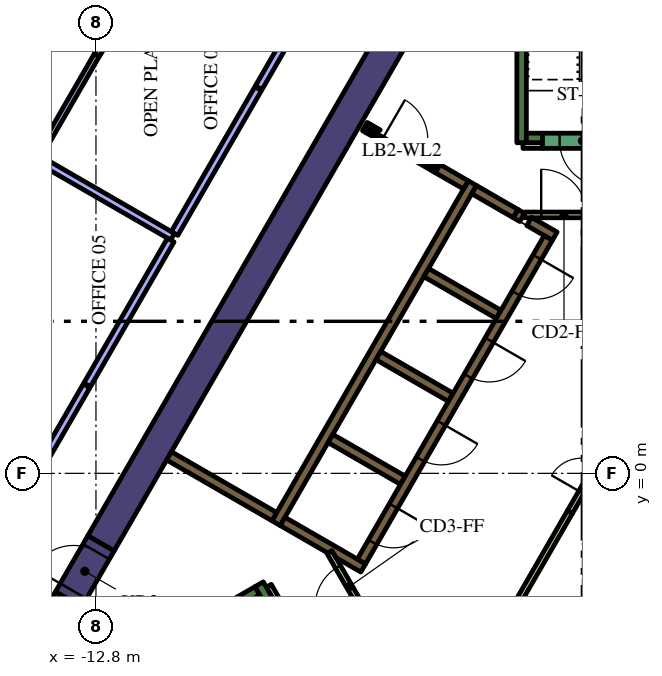
"""IFC4 building model, lengths in metres.
Left out: names, types, materials, properties, quantities, classifications, styles, units other than length and angle.
Written with IfcOpenShell. Run it as: python <this file> out.ifc"""

import sys

from ifc_helpers import new_model, si_unit, direction, frame, frame_2d, origin, place, context, subcontext, project, spatial, polyline, rectangle, outline, extrude, element, fill, save


model = new_model("IFC4")
c1 = context("Model", 3, precision=1e-05, world=origin(), true_north=direction((0.0, 1.0)))
c2 = subcontext(c1, "Body", "Model", "MODEL_VIEW")
j1 = project(units=[si_unit("LENGTHUNIT", "METRE"), si_unit("PLANEANGLEUNIT", "RADIAN")], contexts=[c1])
p1 = place(None, origin())
s1 = spatial("IfcSite", under=j1, at=p1, CompositionType="ELEMENT")
p2 = place(p1, origin())
s2 = spatial("IfcBuilding", under=s1, at=p2, CompositionType="ELEMENT")
p3 = place(p2, frame((0.0, 0.0, 162.6)))
s3 = spatial("IfcBuildingStorey", under=s2, at=p3, CompositionType="ELEMENT", Elevation=162.6)
p4 = place(p3, frame((-13.518, -3.314, 0.0), z_axis=(0.0, 0.0, 1.0), x_axis=(-0.499969377405, -0.866043083026, 0.0)))
e1 = element("IfcWall", 1, at=p4, inside=s3, PredefinedType="SOLIDWALL", context=c2, shape_type="SweptSolid", body=[
    extrude(rectangle(XDim=2.824, YDim=0.8, at=frame_2d((1.412, 0.0))), origin(), (0.0, 0.0, 1.0), 4.2),
])
p5 = place(p3, frame((-12.668, -1.842, 0.0), z_axis=(0.0, 0.0, 1.0), x_axis=(0.500003640647, 0.866023301845, 0.0)))
e2 = element("IfcWall", 2, at=p5, inside=s3, PredefinedType="SOLIDWALL", context=c2, shape_type="SweptSolid", body=[
    extrude(rectangle(XDim=15.858, YDim=0.8, at=frame_2d((7.929, 0.0))), origin(), (0.0, 0.0, 1.0), 4.2),
])
p6 = place(p3, frame((-1.6, 8.7, 0.0), z_axis=(0.0, 0.0, 1.0), x_axis=(0.0, 1.0, 0.0)))
e3 = element("IfcWall", 3, at=p6, inside=s3, PredefinedType="SOLIDWALL", context=c2, shape_type="SweptSolid", body=[
    extrude(rectangle(XDim=7.05, YDim=0.25, at=frame_2d((3.525, 0.0))), origin(), (0.0, 0.0, 1.0), 4.2),
])
p7 = place(p3, frame((-1.475, 8.825, 0.0), z_axis=(0.0, 0.0, 1.0), x_axis=(1.0, 0.0, 0.0)))
e4 = element("IfcWall", 4, at=p7, inside=s3, PredefinedType="SOLIDWALL", context=c2, shape_type="SweptSolid", body=[
    extrude(rectangle(XDim=0.425, YDim=0.25, at=frame_2d((0.212, 0.0))), origin(), (0.0, 0.0, 1.0), 4.2),
])
p8 = place(p3, frame((-14.44, -6.49, 0.0), z_axis=(0.0, 0.0, 1.0), x_axis=(0.866022966069, 0.500004222222, 0.0)))
e5 = element("IfcWall", 5, at=p8, inside=s3, PredefinedType="SOLIDWALL", context=c2, shape_type="SweptSolid", body=[
    extrude(rectangle(XDim=6.8, YDim=0.25, at=frame_2d((3.4, 0.0))), origin(), (0.0, 0.0, 1.0), 4.2),
])
p9 = place(p3, frame((-8.168, -3.503, 0.0), z_axis=(0.0, 0.0, 1.0), x_axis=(-0.499952099219, 0.866053057547, 0.0)))
e6 = element("IfcWall", 6, at=p9, inside=s3, PredefinedType="SOLIDWALL", context=c2, shape_type="SweptSolid", body=[
    extrude(rectangle(XDim=0.675, YDim=0.25, at=frame_2d((0.337, 0.0))), origin(), (0.0, 0.0, 1.0), 4.2),
])
p10 = place(p3, frame((-8.06, -1.311, 0.0), z_axis=(0.0, 0.0, 1.0), x_axis=(0.50000273126, 0.866023826885, 0.0)))
e7 = element("IfcWall", 7, at=p10, inside=s3, PredefinedType="SOLIDWALL", context=c2, shape_type="SweptSolid", body=[
    extrude(rectangle(XDim=10.33, YDim=0.25, at=frame_2d((5.165, 0.0))), origin(), (0.0, 0.0, 1.0), 4.2),
])
p11 = place(p3, frame((-1.758, 6.835, 0.0), z_axis=(0.0, 0.0, 1.0), x_axis=(0.865982457891, -0.500074377092, 0.0)))
e8 = element("IfcWall", 8, at=p11, inside=s3, PredefinedType="SOLIDWALL", context=c2, shape_type="SweptSolid", body=[
    extrude(rectangle(XDim=0.2, YDim=0.25, at=frame_2d((0.1, 0.0))), origin(), (0.0, 0.0, 1.0), 4.2),
])
p12 = place(p3, frame((-1.76, 6.836, 0.0), z_axis=(0.0, 0.0, 1.0), x_axis=(-0.865952863304, 0.500125622755, 0.0)))
e9 = element("IfcWall", 9, at=p12, inside=s3, PredefinedType="SOLIDWALL", context=c2, shape_type="SweptSolid", body=[
    extrude(rectangle(XDim=1.258, YDim=0.25, at=frame_2d((0.629, 0.0))), origin(), (0.0, 0.0, 1.0), 4.2),
])
p13 = place(p3, frame((-0.728, 6.24, 0.0), z_axis=(0.0, 0.0, 1.0), x_axis=(-0.865955664968, 0.500120771724, 0.0)))
e10 = element("IfcWall", 10, at=p13, inside=s3, PredefinedType="SOLIDWALL", context=c2, shape_type="SweptSolid", body=[
    extrude(rectangle(XDim=0.778, YDim=0.25, at=frame_2d((0.389, 0.0))), origin(), (0.0, 0.0, 1.0), 4.2),
])
for number, where, z_axis, x_axis in (
    (11, (-2.204, 4.182, 0.0), (0.0, 0.0, 1.0), (-0.866, 0.5, 0.0)),
    (12, (-5.369, 3.1, 0.0), (0.0, 0.0, 1.0), (0.866, -0.5, 0.0)),
    (13, (-4.724, -0.182, 0.0), (0.0, 0.0, 1.0), (-0.866, 0.5, 0.0)),
):
    element("IfcWall", number, at=place(p3, frame(where, z_axis=z_axis, x_axis=x_axis)), inside=s3, PredefinedType="SOLIDWALL", context=c2, shape_type="SweptSolid", body=[
        extrude(rectangle(XDim=2.2, YDim=0.25, at=frame_2d((1.1, 0.0))), origin(), (0.0, 0.0, 1.0), 4.2),
    ])
p14 = place(p3, origin())
e14 = element("IfcWall", 14, at=p14, inside=s3, PredefinedType="SOLIDWALL", context=c2, shape_type="SweptSolid", body=[
    extrude(outline(polyline([(-5.922, -2.257), (-5.922, -2.257), (-5.705, -2.382), (-5.83, -2.598), (-6.483, -2.221), (-6.591, -2.033), (-6.591, -2.033), (-6.7, -2.096), (-7.952, -1.373), (-7.827, -1.156), (-5.922, -2.257)])), origin(), (0.0, 0.0, 1.0), 4.2),
])
p15 = place(p3, frame((-8.106, -1.14, 0.0), z_axis=(0.0, 0.0, 1.0), x_axis=(-0.866008981251, 0.500028443584, 0.0)))
e15 = element("IfcWall", 15, at=p15, inside=s3, PredefinedType="SOLIDWALL", context=c2, shape_type="SweptSolid", body=[
    extrude(rectangle(XDim=3.2, YDim=0.25, at=frame_2d((1.6, 0.0))), origin(), (0.0, 0.0, 1.0), 4.2),
])
p16 = place(p3, frame((-5.725, 9.125, 0.0), z_axis=(0.0, 0.0, 1.0), x_axis=(0.866185586049, -0.49972245349, 0.0)))
e16 = element("IfcWall", 16, at=p16, inside=s3, PredefinedType="SOLIDWALL", context=c2, shape_type="SweptSolid", body=[
    extrude(rectangle(XDim=0.11, YDim=0.25, at=frame_2d((0.055, 0.0))), origin(), (0.0, 0.0, 1.0), 4.2),
])
p17 = place(p3, frame((-3.066, 7.59, 0.0), z_axis=(0.0, 0.0, 1.0), x_axis=(-0.866081358704, 0.49990307071, 0.0)))
e17 = element("IfcWall", 17, at=p17, inside=s3, PredefinedType="SOLIDWALL", context=c2, shape_type="SweptSolid", body=[
    extrude(rectangle(XDim=0.858, YDim=0.25, at=frame_2d((0.429, 0.0))), origin(), (0.0, 0.0, 1.0), 4.2),
])
e18 = element("IfcWall", 18, at=p14, inside=s3, PredefinedType="SOLIDWALL", context=c2, shape_type="SweptSolid", body=[
    extrude(outline(polyline([(-3.748, 8.128), (-3.813, 8.015), (-4.027, 8.139), (-4.017, 8.156), (-4.008, 8.173), (-4.0, 8.192), (-3.995, 8.21), (-3.991, 8.23), (-3.99, 8.25), (-3.99, 8.268), (-3.748, 8.128)])), origin(), (0.0, 0.0, 1.0), 4.2),
])
e19 = element("IfcWall", 19, at=p14, inside=s3, PredefinedType="SOLIDWALL", context=c2, shape_type="SweptSolid", body=[
    extrude(outline(polyline([(-5.689, 8.96), (-5.69, 8.961), (-5.565, 9.177), (-5.319, 9.035), (-5.335, 9.026), (-5.351, 9.015), (-5.366, 9.002), (-5.379, 8.988), (-5.392, 8.972), (-5.402, 8.956), (-5.412, 8.939), (-5.629, 9.064), (-5.629, 9.064), (-5.689, 8.96)])), origin(), (0.0, 0.0, 1.0), 4.2),
])
for number, where, z_axis, x_axis in (
    (20, (-8.252, -2.958, 0.0), (0.0, 0.0, 1.0), (0.5, -0.866, 0.0)),
    (21, (-1.564, 8.625, 0.0), (0.0, 0.0, 1.0), (1.0, 0.0, 0.0)),
):
    element("IfcWall", number, at=place(p3, frame(where, z_axis=z_axis, x_axis=x_axis)), inside=s3, PredefinedType="PARTITIONING", context=c2, shape_type="SweptSolid", body=[
        extrude(rectangle(XDim=0.514, YDim=0.15, at=frame_2d((0.257, 0.0))), origin(), (0.0, 0.0, 1.0), 3.15),
    ])
p18 = place(p3, frame((-1.887, -3.718, 0.0), z_axis=(0.0, 0.0, 1.0), x_axis=(0.500043732237, 0.866000153493, 0.0)))
e22 = element("IfcWall", 22, at=p18, inside=s3, PredefinedType="PARTITIONING", context=c2, shape_type="SweptSolid", body=[
    extrude(rectangle(XDim=3.114, YDim=0.15, at=frame_2d((1.557, 0.0))), origin(), (0.0, 0.0, 1.0), 3.15),
])
p19 = place(p3, frame((-0.898, 6.194, 0.0), z_axis=(0.0, 0.0, 1.0), x_axis=(-0.499996202215, -0.866027596426, 0.0)))
e23 = element("IfcWall", 23, at=p19, inside=s3, PredefinedType="SOLIDWALL", context=c2, shape_type="SweptSolid", body=[
    extrude(rectangle(XDim=9.83, YDim=0.25, at=frame_2d((4.915, 0.0))), origin(), (0.0, 0.0, 1.0), 4.2),
])
p20 = place(p19, frame((0.585, 0.0, 0.0)))
e24 = element("IfcOpeningElement", 24, at=p20, cuts=e23, PredefinedType="OPENING", context=c2, shape_type="SweptSolid", body=[
    extrude(rectangle(XDim=1.1, YDim=2.1, at=frame_2d((0.55, 1.05))), frame((0.0, 0.135, 0.0), z_axis=(0.0, -1.0, 0.0), x_axis=(1.0, 0.0, 0.0)), (0.0, 0.0, 1.0), 0.27),
])
p21 = place(p19, frame((3.105, 0.0, 0.0)))
e25 = element("IfcOpeningElement", 25, at=p21, cuts=e23, PredefinedType="OPENING", context=c2, shape_type="SweptSolid", body=[
    extrude(rectangle(XDim=1.1, YDim=2.1, at=frame_2d((0.55, 1.05))), frame((0.0, 0.135, 0.0), z_axis=(0.0, -1.0, 0.0), x_axis=(1.0, 0.0, 0.0)), (0.0, 0.0, 1.0), 0.27),
])
p22 = place(p19, frame((5.625, 0.0, 0.0)))
e26 = element("IfcOpeningElement", 26, at=p22, cuts=e23, PredefinedType="OPENING", context=c2, shape_type="SweptSolid", body=[
    extrude(rectangle(XDim=1.1, YDim=2.1, at=frame_2d((0.55, 1.05))), frame((0.0, 0.135, 0.0), z_axis=(0.0, -1.0, 0.0), x_axis=(1.0, 0.0, 0.0)), (0.0, 0.0, 1.0), 0.27),
])
p23 = place(p19, frame((8.145, 0.0, 0.0)))
e27 = element("IfcOpeningElement", 27, at=p23, cuts=e23, PredefinedType="OPENING", context=c2, shape_type="SweptSolid", body=[
    extrude(rectangle(XDim=1.1, YDim=2.1, at=frame_2d((0.55, 1.05))), frame((0.0, 0.135, 0.0), z_axis=(0.0, -1.0, 0.0), x_axis=(1.0, 0.0, 0.0)), (0.0, 0.0, 1.0), 0.27),
])
p24 = place(p3, frame((1.05, 8.75, 0.0), z_axis=(0.0, 0.0, 1.0), x_axis=(-1.0, 0.0, 0.0)))
e28 = element("IfcWall", 28, at=p24, inside=s3, PredefinedType="SOLIDWALL", context=c2, shape_type="SweptSolid", body=[
    extrude(rectangle(XDim=2.1, YDim=0.4, at=frame_2d((1.05, 0.0))), origin(), (0.0, 0.0, 1.0), 4.2),
])
p25 = place(p24, frame((0.45, 0.0, 0.0)))
e29 = element("IfcOpeningElement", 29, at=p25, cuts=e28, PredefinedType="OPENING", context=c2, shape_type="SweptSolid", body=[
    extrude(rectangle(XDim=1.2, YDim=2.1, at=frame_2d((0.6, 1.05))), frame((0.0, 0.21, 0.0), z_axis=(0.0, -1.0, 0.0), x_axis=(1.0, 0.0, 0.0)), (0.0, 0.0, 1.0), 0.42),
])
p26 = place(p3, frame((-0.33, -1.022, 0.0), z_axis=(0.0, 0.0, 1.0), x_axis=(0.500027713859, 0.866009402589, 0.0)))
e30 = element("IfcWall", 30, at=p26, inside=s3, PredefinedType="PARTITIONING", context=c2, shape_type="SweptSolid", body=[
    extrude(rectangle(XDim=2.1, YDim=0.15, at=frame_2d((1.05, 0.0))), origin(), (0.0, 0.0, 1.0), 3.15),
])
p27 = place(p26, frame((0.6, 0.0, 0.0)))
e31 = element("IfcOpeningElement", 31, at=p27, cuts=e30, PredefinedType="OPENING", context=c2, shape_type="SweptSolid", body=[
    extrude(rectangle(XDim=0.9, YDim=2.1, at=frame_2d((0.45, 1.05))), frame((0.0, 0.085, 0.0), z_axis=(0.0, -1.0, 0.0), x_axis=(1.0, 0.0, 0.0)), (0.0, 0.0, 1.0), 0.17),
])
p28 = place(p3, frame((-1.534, 6.8, 0.0), z_axis=(0.0, 0.0, 1.0), x_axis=(1.0, 0.0, 0.0)))
e32 = element("IfcWall", 32, at=p28, inside=s3, PredefinedType="PARTITIONING", context=c2, shape_type="SweptSolid", body=[
    extrude(rectangle(XDim=2.1, YDim=0.15, at=frame_2d((1.05, 0.0))), origin(), (0.0, 0.0, 1.0), 3.15),
])
p29 = place(p28, frame((0.45, 0.0, 0.0)))
e33 = element("IfcOpeningElement", 33, at=p29, cuts=e32, PredefinedType="OPENING", context=c2, shape_type="SweptSolid", body=[
    extrude(rectangle(XDim=1.2, YDim=2.1, at=frame_2d((0.6, 1.05))), frame((0.0, 0.085, 0.0), z_axis=(0.0, -1.0, 0.0), x_axis=(1.0, 0.0, 0.0)), (0.0, 0.0, 1.0), 0.17),
])
p30 = place(p3, frame((-5.606, -3.89, 0.0), z_axis=(0.0, 0.0, 1.0), x_axis=(-0.500027713859, 0.866009402589, 0.0)))
e34 = element("IfcWall", 34, at=p30, inside=s3, PredefinedType="PARTITIONING", context=c2, shape_type="SweptSolid", body=[
    extrude(rectangle(XDim=2.1, YDim=0.15, at=frame_2d((1.05, 0.0))), origin(), (0.0, 0.0, 1.0), 3.15),
])
p31 = place(p30, frame((0.45, 0.0, 0.0)))
e35 = element("IfcOpeningElement", 35, at=p31, cuts=e34, PredefinedType="OPENING", context=c2, shape_type="SweptSolid", body=[
    extrude(rectangle(XDim=1.2, YDim=2.1, at=frame_2d((0.6, 1.05))), frame((0.0, 0.085, 0.0), z_axis=(0.0, -1.0, 0.0), x_axis=(1.0, 0.0, 0.0)), (0.0, 0.0, 1.0), 0.17),
])
p32 = place(p3, frame((-5.659, 9.012, 0.0), z_axis=(0.0, 0.0, 1.0), x_axis=(0.866009402589, -0.500027713859, 0.0)))
e36 = element("IfcWall", 36, at=p32, inside=s3, PredefinedType="PARTITIONING", context=c2, shape_type="SweptSolid", body=[
    extrude(rectangle(XDim=2.1, YDim=0.12, at=frame_2d((1.05, 0.0))), origin(), (0.0, 0.0, 1.0), 3.15),
])
p33 = place(p32, frame((0.45, 0.0, 0.0)))
e37 = element("IfcOpeningElement", 37, at=p33, cuts=e36, PredefinedType="OPENING", context=c2, shape_type="SweptSolid", body=[
    extrude(rectangle(XDim=1.2, YDim=2.1, at=frame_2d((0.6, 1.05))), frame((0.0, 0.07, 0.0), z_axis=(0.0, -1.0, 0.0), x_axis=(1.0, 0.0, 0.0)), (0.0, 0.0, 1.0), 0.14),
])
p34 = place(p3, frame((-13.518, -3.314, 0.0), z_axis=(0.0, 0.0, 1.0), x_axis=(0.500062241894, 0.865989465428, 0.0)))
e38 = element("IfcWall", 38, at=p34, inside=s3, PredefinedType="SOLIDWALL", context=c2, shape_type="SweptSolid", body=[
    extrude(rectangle(XDim=1.7, YDim=0.8, at=frame_2d((0.85, 0.0))), origin(), (0.0, 0.0, 1.0), 4.2),
])
p35 = place(p34, frame((0.25, 0.0, 0.0)))
e39 = element("IfcOpeningElement", 39, at=p35, cuts=e38, PredefinedType="OPENING", context=c2, shape_type="SweptSolid", body=[
    extrude(rectangle(XDim=1.2, YDim=2.1, at=frame_2d((0.6, 1.05))), frame((0.0, 0.41, 0.0), z_axis=(0.0, -1.0, 0.0), x_axis=(1.0, 0.0, 0.0)), (0.0, 0.0, 1.0), 0.82),
])
p36 = place(p3, frame((-12.779, 11.002, 0.0), z_axis=(0.0, 0.0, 1.0), x_axis=(0.527026092571, 0.849849102929, 0.0)))
e40 = element("IfcWall", 40, at=p36, inside=s3, PredefinedType="PARTITIONING", context=c2, shape_type="SweptSolid", body=[
    extrude(rectangle(XDim=6.407, YDim=0.15, at=frame_2d((3.204, 0.0))), origin(), (0.0, 0.0, 1.0), 3.15),
])
p37 = place(p36, frame((2.707, 0.0, 0.0)))
e41 = element("IfcOpeningElement", 41, at=p37, cuts=e40, PredefinedType="OPENING", context=c2, shape_type="SweptSolid", body=[
    extrude(rectangle(XDim=0.9, YDim=2.1, at=frame_2d((0.45, 1.05))), frame((0.0, 0.085, 0.0), z_axis=(0.0, -1.0, 0.0), x_axis=(1.0, 0.0, 0.0)), (0.0, 0.0, 1.0), 0.17),
])
p38 = place(p3, frame((-12.779, 11.002, 0.0), z_axis=(0.0, 0.0, 1.0), x_axis=(-0.499996312652, -0.866027532665, 0.0)))
e42 = element("IfcWall", 42, at=p38, inside=s3, PredefinedType="PARTITIONING", context=c2, shape_type="SweptSolid", body=[
    extrude(rectangle(XDim=3.138, YDim=0.15, at=frame_2d((1.569, 0.0))), origin(), (0.0, 0.0, 1.0), 3.15),
])
p39 = place(p3, frame((-10.782, 6.225, 0.0), z_axis=(0.0, 0.0, 1.0), x_axis=(-0.866034752867, 0.499983806564, 0.0)))
e43 = element("IfcWall", 43, at=p39, inside=s3, PredefinedType="PARTITIONING", context=c2, shape_type="SweptSolid", body=[
    extrude(rectangle(XDim=4.043, YDim=0.2, at=frame_2d((2.021, 0.0))), origin(), (0.0, 0.0, 1.0), 3.15),
])
p40 = place(p3, frame((-8.532, 10.122, 0.0), z_axis=(0.0, 0.0, 1.0), x_axis=(-0.499988222896, -0.866032203192, 0.0)))
e44 = element("IfcWall", 44, at=p40, inside=s3, PredefinedType="PARTITIONING", context=c2, shape_type="SweptSolid", body=[
    extrude(rectangle(XDim=4.4, YDim=0.2, at=frame_2d((2.2, 0.0))), origin(), (0.0, 0.0, 1.0), 3.15),
])
p41 = place(p3, frame((-3.522, 18.8, 0.0), z_axis=(0.0, 0.0, 1.0), x_axis=(-0.500015783377, -0.866016291056, 0.0)))
e45 = element("IfcWall", 45, at=p41, inside=s3, PredefinedType="PARTITIONING", context=c2, shape_type="SweptSolid", body=[
    extrude(rectangle(XDim=9.99, YDim=0.2, at=frame_2d((4.995, 0.0))), origin(), (0.0, 0.0, 1.0), 3.15),
])
p42 = place(p41, frame((4.5, 0.0, 0.0)))
e46 = element("IfcOpeningElement", 46, at=p42, cuts=e45, PredefinedType="OPENING", context=c2, shape_type="SweptSolid", body=[
    extrude(rectangle(XDim=1.0, YDim=2.1, at=frame_2d((0.5, 1.05))), frame((0.0, 0.11, 0.0), z_axis=(0.0, -1.0, 0.0), x_axis=(1.0, 0.0, 0.0)), (0.0, 0.0, 1.0), 0.22),
])
p43 = place(p3, frame((-10.832, 6.138, 0.0), z_axis=(0.0, 0.0, 1.0), x_axis=(-0.499988222896, -0.866032203192, 0.0)))
e47 = element("IfcWall", 47, at=p43, inside=s3, PredefinedType="PARTITIONING", context=c2, shape_type="SweptSolid", body=[
    extrude(rectangle(XDim=4.4, YDim=0.2, at=frame_2d((2.2, 0.0))), origin(), (0.0, 0.0, 1.0), 3.15),
])
p44 = place(p3, frame((-13.047, 2.302, 0.0), z_axis=(0.0, 0.0, 1.0), x_axis=(-0.499986873641, -0.866032982159, 0.0)))
e48 = element("IfcWall", 48, at=p44, inside=s3, PredefinedType="PARTITIONING", context=c2, shape_type="SweptSolid", body=[
    extrude(rectangle(XDim=9.99, YDim=0.2, at=frame_2d((4.995, 0.0))), origin(), (0.0, 0.0, 1.0), 3.15),
])
p45 = place(p44, frame((4.5, 0.0, 0.0)))
e49 = element("IfcOpeningElement", 49, at=p45, cuts=e48, PredefinedType="OPENING", context=c2, shape_type="SweptSolid", body=[
    extrude(rectangle(XDim=1.0, YDim=2.1, at=frame_2d((0.5, 1.05))), frame((0.0, 0.11, 0.0), z_axis=(0.0, -1.0, 0.0), x_axis=(1.0, 0.0, 0.0)), (0.0, 0.0, 1.0), 0.22),
])
p46 = place(p20, origin())
e50 = element("IfcDoor", 50, at=p46, inside=s3, OperationType="DOUBLE_DOOR_SLIDING", PredefinedType="DOOR", context=c2, shape_type="SweptSolid", body=[
    extrude(rectangle(XDim=1.1, YDim=2.1, at=frame_2d((0.55, 1.05))), frame((0.0, 0.025, 0.0), z_axis=(0.0, -1.0, 0.0), x_axis=(1.0, 0.0, 0.0)), (0.0, 0.0, 1.0), 0.05),
])
fill(e24, e50)
p47 = place(p21, origin())
e51 = element("IfcDoor", 51, at=p47, inside=s3, OperationType="DOUBLE_DOOR_SLIDING", PredefinedType="DOOR", context=c2, shape_type="SweptSolid", body=[
    extrude(rectangle(XDim=1.1, YDim=2.1, at=frame_2d((0.55, 1.05))), frame((0.0, 0.025, 0.0), z_axis=(0.0, -1.0, 0.0), x_axis=(1.0, 0.0, 0.0)), (0.0, 0.0, 1.0), 0.05),
])
fill(e25, e51)
p48 = place(p22, origin())
e52 = element("IfcDoor", 52, at=p48, inside=s3, OperationType="DOUBLE_DOOR_SLIDING", PredefinedType="DOOR", context=c2, shape_type="SweptSolid", body=[
    extrude(rectangle(XDim=1.1, YDim=2.1, at=frame_2d((0.55, 1.05))), frame((0.0, 0.025, 0.0), z_axis=(0.0, -1.0, 0.0), x_axis=(1.0, 0.0, 0.0)), (0.0, 0.0, 1.0), 0.05),
])
fill(e26, e52)
p49 = place(p23, origin())
e53 = element("IfcDoor", 53, at=p49, inside=s3, OperationType="DOUBLE_DOOR_SLIDING", PredefinedType="DOOR", context=c2, shape_type="SweptSolid", body=[
    extrude(rectangle(XDim=1.1, YDim=2.1, at=frame_2d((0.55, 1.05))), frame((0.0, 0.025, 0.0), z_axis=(0.0, -1.0, 0.0), x_axis=(1.0, 0.0, 0.0)), (0.0, 0.0, 1.0), 0.05),
])
fill(e27, e53)
p50 = place(p25, origin())
e54 = element("IfcDoor", 54, at=p50, inside=s3, OperationType="SINGLE_SWING_LEFT", PredefinedType="DOOR", context=c2, shape_type="SweptSolid", body=[
    extrude(rectangle(XDim=1.2, YDim=2.1, at=frame_2d((0.6, 1.05))), frame((0.0, 0.025, 0.0), z_axis=(0.0, -1.0, 0.0), x_axis=(1.0, 0.0, 0.0)), (0.0, 0.0, 1.0), 0.05),
])
fill(e29, e54)
p51 = place(p27, origin())
e55 = element("IfcDoor", 55, at=p51, inside=s3, OperationType="SINGLE_SWING_LEFT", PredefinedType="DOOR", context=c2, shape_type="SweptSolid", body=[
    extrude(rectangle(XDim=0.9, YDim=2.1, at=frame_2d((0.45, 1.05))), frame((0.0, 0.025, 0.0), z_axis=(0.0, -1.0, 0.0), x_axis=(1.0, 0.0, 0.0)), (0.0, 0.0, 1.0), 0.05),
])
fill(e31, e55)
p52 = place(p29, origin())
e56 = element("IfcDoor", 56, at=p52, inside=s3, OperationType="SINGLE_SWING_LEFT", PredefinedType="DOOR", context=c2, shape_type="SweptSolid", body=[
    extrude(rectangle(XDim=1.2, YDim=2.1, at=frame_2d((0.6, 1.05))), frame((0.0, 0.025, 0.0), z_axis=(0.0, -1.0, 0.0), x_axis=(1.0, 0.0, 0.0)), (0.0, 0.0, 1.0), 0.05),
])
fill(e33, e56)
p53 = place(p31, origin())
e57 = element("IfcDoor", 57, at=p53, inside=s3, OperationType="SINGLE_SWING_LEFT", PredefinedType="DOOR", context=c2, shape_type="SweptSolid", body=[
    extrude(rectangle(XDim=1.2, YDim=2.1, at=frame_2d((0.6, 1.05))), frame((0.0, 0.025, 0.0), z_axis=(0.0, -1.0, 0.0), x_axis=(1.0, 0.0, 0.0)), (0.0, 0.0, 1.0), 0.05),
])
fill(e35, e57)
p54 = place(p33, origin())
e58 = element("IfcDoor", 58, at=p54, inside=s3, OperationType="SINGLE_SWING_LEFT", PredefinedType="DOOR", context=c2, shape_type="SweptSolid", body=[
    extrude(rectangle(XDim=1.2, YDim=2.1, at=frame_2d((0.6, 1.05))), frame((0.0, 0.025, 0.0), z_axis=(0.0, -1.0, 0.0), x_axis=(1.0, 0.0, 0.0)), (0.0, 0.0, 1.0), 0.05),
])
fill(e37, e58)
p55 = place(p35, origin())
e59 = element("IfcDoor", 59, at=p55, inside=s3, OperationType="SINGLE_SWING_LEFT", PredefinedType="DOOR", context=c2, shape_type="SweptSolid", body=[
    extrude(rectangle(XDim=1.2, YDim=2.1, at=frame_2d((0.6, 1.05))), frame((0.0, 0.025, 0.0), z_axis=(0.0, -1.0, 0.0), x_axis=(1.0, 0.0, 0.0)), (0.0, 0.0, 1.0), 0.05),
])
fill(e39, e59)
save(model, sys.argv[1])
